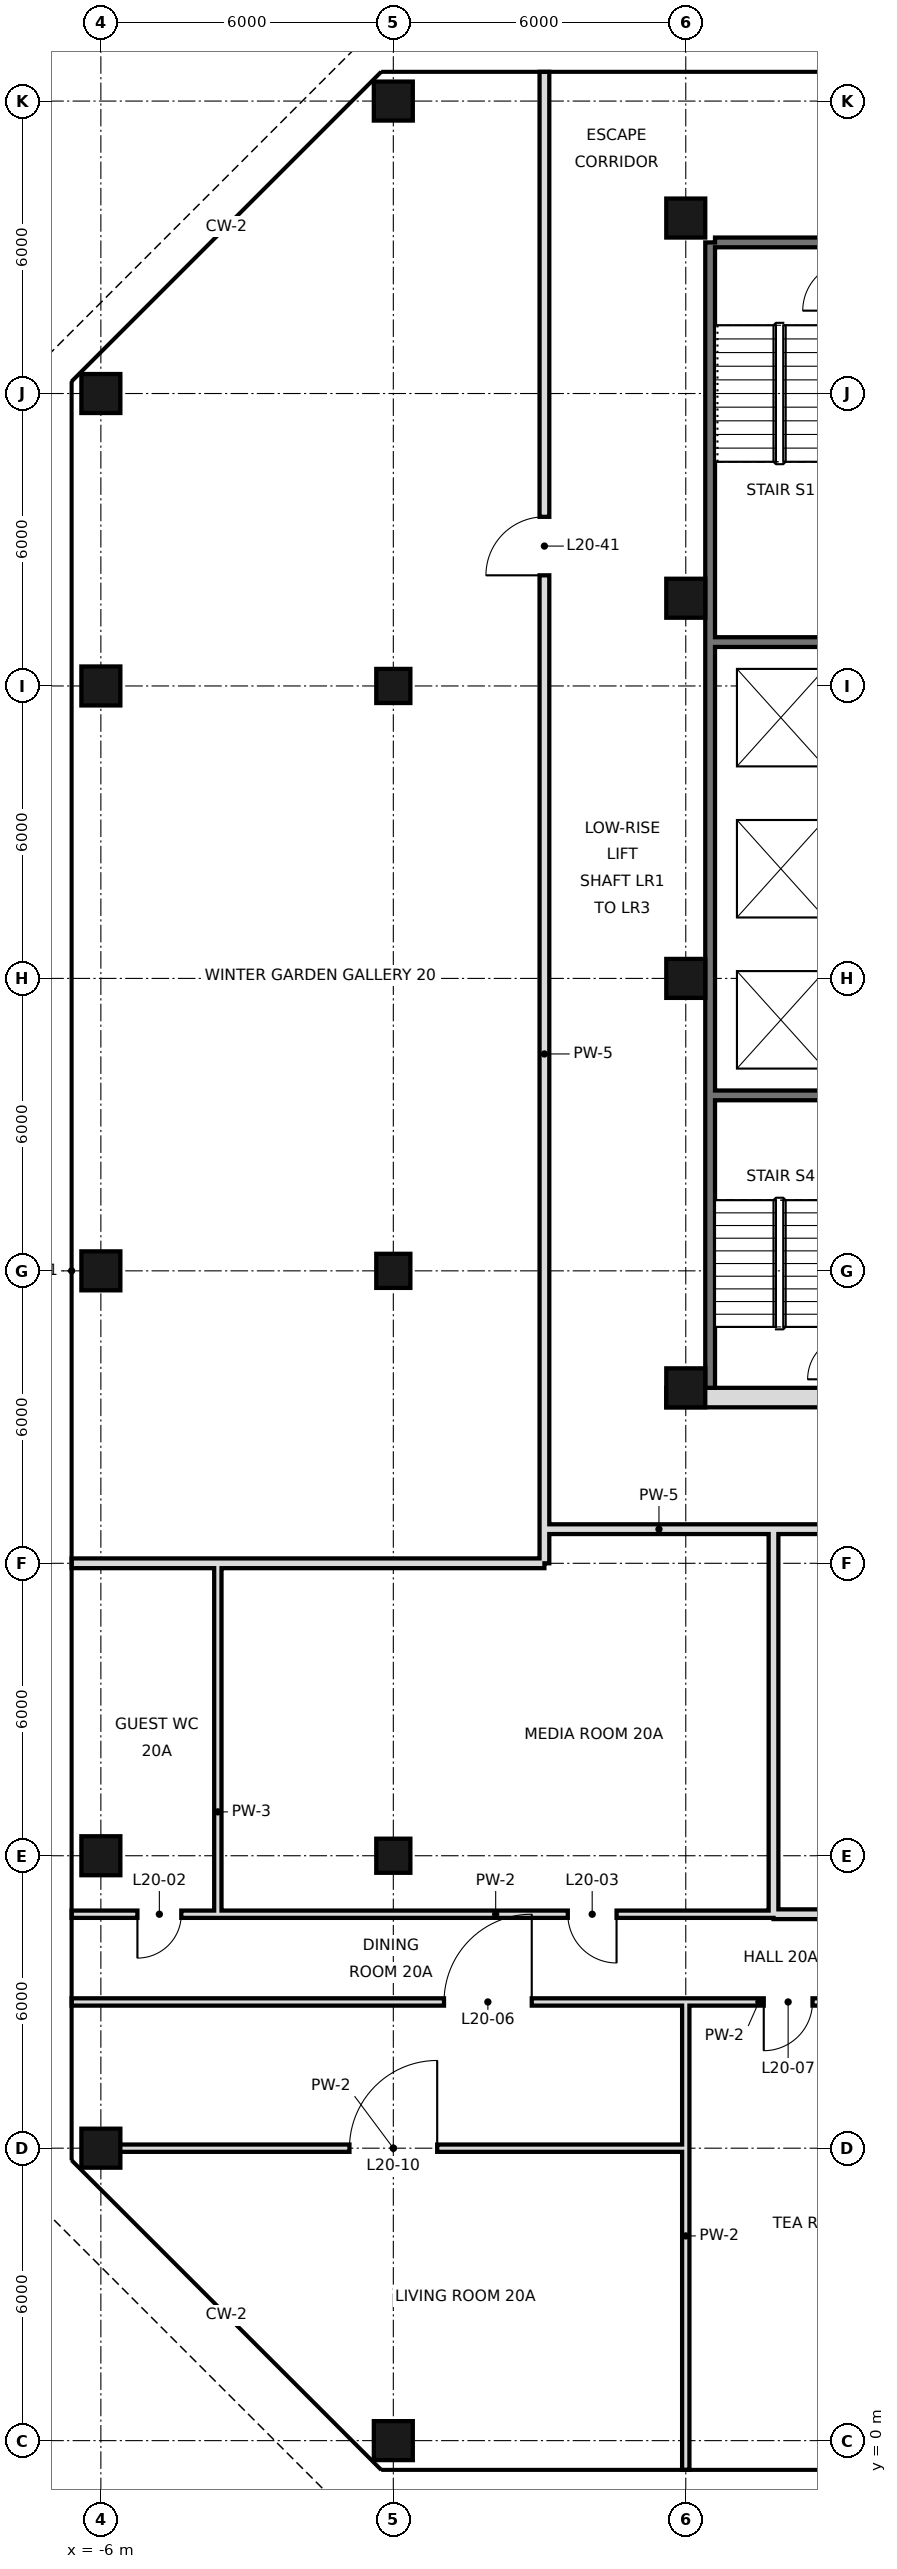
"""IFC4 building model, lengths in metres.
Left out: names, types, materials, properties, quantities, classifications, styles, units other than length and angle.
Written with IfcOpenShell. Run it as: python <this file> out.ifc"""

import sys

from ifc_helpers import new_model, si_unit, direction, frame, frame_2d, origin, origin_2d, place, context, subcontext, project, spatial, rectangle, hollow_rectangle, extrude, element, fill, save


model = new_model("IFC4")
c1 = context("Model", 3, precision=1e-05, world=origin(), true_north=direction((0.0, 1.0)))
c2 = subcontext(c1, "Body", "Model", "MODEL_VIEW")
j1 = project(units=[si_unit("LENGTHUNIT", "METRE"), si_unit("PLANEANGLEUNIT", "RADIAN")], contexts=[c1])
p1 = place(None, origin())
s1 = spatial("IfcSite", under=j1, at=p1, CompositionType="ELEMENT")
p2 = place(p1, origin())
s2 = spatial("IfcBuilding", under=s1, at=p2, CompositionType="ELEMENT")
p3 = place(p2, frame((0.0, 0.0, 96.2)))
s3 = spatial("IfcBuildingStorey", under=s2, at=p3, CompositionType="ELEMENT", Elevation=96.2)
for number, where, z_axis, x_axis in (
    (1, (-6.0, 6.0, -0.3), (0.0, 0.0, 1.0), (1.0, 0.0, 0.0)),
    (2, (-6.0, 12.0, -0.3), (0.0, 0.0, 1.0), (1.0, 0.0, 0.0)),
    (3, (-6.0, 24.0, -0.3), (0.0, 0.0, 1.0), (1.0, 0.0, 0.0)),
    (4, (-6.0, 36.0, -0.3), (0.0, 0.0, 1.0), (1.0, 0.0, 0.0)),
    (5, (-6.0, 42.0, -0.3), (0.0, 0.0, 1.0), (1.0, 0.0, 0.0)),
    (6, (0.0, 0.0, -0.3), (0.0, 0.0, 1.0), (1.0, 0.0, 0.0)),
):
    element("IfcColumn", number, at=place(p3, frame(where, z_axis=z_axis, x_axis=x_axis)), inside=s3, PredefinedType="COLUMN", context=c2, shape_type="SweptSolid", body=[
        extrude(hollow_rectangle(XDim=0.8, YDim=0.8, WallThickness=0.04, at=origin_2d()), origin(), (0.0, 0.0, 1.0), 3.9),
    ])
for number, where, z_axis, x_axis in (
    (7, (0.0, 12.0, 0.0), (0.0, 0.0, 1.0), (1.0, 0.0, 0.0)),
    (8, (0.0, 24.0, 0.0), (0.0, 0.0, 1.0), (1.0, 0.0, 0.0)),
    (9, (0.0, 36.0, 0.0), (0.0, 0.0, 1.0), (1.0, 0.0, 0.0)),
):
    element("IfcColumn", number, at=place(p3, frame(where, z_axis=z_axis, x_axis=x_axis)), inside=s3, PredefinedType="COLUMN", context=c2, shape_type="SweptSolid", body=[
        extrude(hollow_rectangle(XDim=0.7, YDim=0.7, WallThickness=0.036, at=origin_2d()), origin(), (0.0, 0.0, 1.0), 3.6),
    ])
p4 = place(p3, frame((0.0, 48.0, -0.3), z_axis=(0.0, 0.0, 1.0), x_axis=(1.0, 0.0, 0.0)))
e10 = element("IfcColumn", 10, at=p4, inside=s3, PredefinedType="COLUMN", context=c2, shape_type="SweptSolid", body=[
    extrude(hollow_rectangle(XDim=0.8, YDim=0.8, WallThickness=0.04, at=origin_2d()), origin(), (0.0, 0.0, 1.0), 3.9),
])
for number, where, z_axis, x_axis in (
    (11, (6.0, 21.6, 0.0), (0.0, 0.0, 1.0), (1.0, 0.0, 0.0)),
    (12, (6.0, 30.0, 0.0), (0.0, 0.0, 1.0), (1.0, 0.0, 0.0)),
    (13, (6.0, 37.8, 0.0), (0.0, 0.0, 1.0), (1.0, 0.0, 0.0)),
    (14, (6.0, 45.6, 0.0), (0.0, 0.0, 1.0), (1.0, 0.0, 0.0)),
):
    element("IfcColumn", number, at=place(p3, frame(where, z_axis=z_axis, x_axis=x_axis)), inside=s3, PredefinedType="COLUMN", context=c2, shape_type="SweptSolid", body=[
        extrude(hollow_rectangle(XDim=0.8, YDim=0.8, WallThickness=0.05, at=origin_2d()), origin(), (0.0, 0.0, 1.0), 3.6),
    ])
p5 = place(p3, frame((-3.6, 10.8, 0.0), z_axis=(0.0, 0.0, 1.0), x_axis=(0.0, 1.0, 0.0)))
e15 = element("IfcWall", 15, at=p5, inside=s3, PredefinedType="PARTITIONING", context=c2, shape_type="SweptSolid", body=[
    extrude(rectangle(XDim=7.2, YDim=0.15, at=frame_2d((3.6, 0.0))), origin(), (0.0, 0.0, 1.0), 3.42),
])
p6 = place(p3, frame((3.1, 18.0, 0.0), z_axis=(0.0, 0.0, 1.0), x_axis=(0.0, 1.0, 0.0)))
e16 = element("IfcWall", 16, at=p6, inside=s3, PredefinedType="SOLIDWALL", context=c2, shape_type="SweptSolid", body=[
    extrude(rectangle(XDim=30.6, YDim=0.2, at=frame_2d((15.3, 0.0))), origin(), (0.0, 0.0, 1.0), 2.72),
])
p7 = place(p6, frame((20.27, 0.0, 0.0)))
e17 = element("IfcOpeningElement", 17, at=p7, cuts=e16, PredefinedType="OPENING", context=c2, shape_type="SweptSolid", body=[
    extrude(rectangle(XDim=1.2, YDim=2.4, at=frame_2d((0.6, 1.2))), frame((0.0, 0.11, 0.0), z_axis=(0.0, -1.0, 0.0), x_axis=(1.0, 0.0, 0.0)), (0.0, 0.0, 1.0), 0.22),
])
p8 = place(p3, frame((6.0, -0.6, 0.0), z_axis=(0.0, 0.0, 1.0), x_axis=(0.0, 1.0, 0.0)))
e18 = element("IfcWall", 18, at=p8, inside=s3, PredefinedType="PARTITIONING", context=c2, shape_type="SweptSolid", body=[
    extrude(rectangle(XDim=9.6, YDim=0.15, at=frame_2d((4.8, 0.0))), origin(), (0.0, 0.0, 1.0), 2.72),
])
p9 = place(p3, frame((7.8, 10.8, 0.0), z_axis=(0.0, 0.0, 1.0), x_axis=(0.0, 1.0, 0.0)))
e19 = element("IfcWall", 19, at=p9, inside=s3, PredefinedType="SOLIDWALL", context=c2, shape_type="SweptSolid", body=[
    extrude(rectangle(XDim=7.9, YDim=0.2, at=frame_2d((3.95, 0.0))), origin(), (0.0, 0.0, 1.0), 2.72),
])
p10 = place(p3, frame((7.8, 10.8, 0.0), z_axis=(0.0, 0.0, 1.0), x_axis=(1.0, 0.0, 0.0)))
e20 = element("IfcWall", 20, at=p10, inside=s3, PredefinedType="SOLIDWALL", context=c2, shape_type="SweptSolid", body=[
    extrude(rectangle(XDim=4.8, YDim=0.2, at=frame_2d((2.4, 0.0))), origin(), (0.0, 0.0, 1.0), 2.72),
])
p11 = place(p10, frame((1.24, 0.0, 0.0)))
e21 = element("IfcOpeningElement", 21, at=p11, cuts=e20, PredefinedType="OPENING", context=c2, shape_type="SweptSolid", body=[
    extrude(rectangle(XDim=1.0, YDim=2.4, at=frame_2d((0.5, 1.2))), frame((0.0, 0.11, 0.0), z_axis=(0.0, -1.0, 0.0), x_axis=(1.0, 0.0, 0.0)), (0.0, 0.0, 1.0), 0.22),
])
p12 = place(p3, frame((-3.6, 10.8, 0.0), z_axis=(0.0, 0.0, 1.0), x_axis=(1.0, 0.0, 0.0)))
e22 = element("IfcWall", 22, at=p12, inside=s3, PredefinedType="PARTITIONING", context=c2, shape_type="SweptSolid", body=[
    extrude(rectangle(XDim=11.4, YDim=0.15, at=frame_2d((5.7, 0.0))), origin(), (0.0, 0.0, 1.0), 3.42),
])
p13 = place(p12, frame((7.18, 0.0, 0.0)))
e23 = element("IfcOpeningElement", 23, at=p13, cuts=e22, PredefinedType="OPENING", context=c2, shape_type="SweptSolid", body=[
    extrude(rectangle(XDim=1.0, YDim=2.4, at=frame_2d((0.5, 1.2))), frame((0.0, 0.085, 0.0), z_axis=(0.0, -1.0, 0.0), x_axis=(1.0, 0.0, 0.0)), (0.0, 0.0, 1.0), 0.17),
])
p14 = place(p3, frame((-6.6, 10.8, 0.0), z_axis=(0.0, 0.0, 1.0), x_axis=(1.0, 0.0, 0.0)))
e24 = element("IfcWall", 24, at=p14, inside=s3, PredefinedType="PARTITIONING", context=c2, shape_type="SweptSolid", body=[
    extrude(rectangle(XDim=3.0, YDim=0.15, at=frame_2d((1.5, 0.0))), origin(), (0.0, 0.0, 1.0), 3.42),
])
p15 = place(p14, frame((1.35, 0.0, 0.0)))
e25 = element("IfcOpeningElement", 25, at=p15, cuts=e24, PredefinedType="OPENING", context=c2, shape_type="SweptSolid", body=[
    extrude(rectangle(XDim=0.9, YDim=2.4, at=frame_2d((0.45, 1.2))), frame((0.0, 0.085, 0.0), z_axis=(0.0, -1.0, 0.0), x_axis=(1.0, 0.0, 0.0)), (0.0, 0.0, 1.0), 0.17),
])
p16 = place(p3, frame((-6.6, 18.0, 0.0), z_axis=(0.0, 0.0, 1.0), x_axis=(1.0, 0.0, 0.0)))
e26 = element("IfcWall", 26, at=p16, inside=s3, PredefinedType="SOLIDWALL", context=c2, shape_type="SweptSolid", body=[
    extrude(rectangle(XDim=9.7, YDim=0.2, at=frame_2d((4.85, 0.0))), origin(), (0.0, 0.0, 1.0), 2.72),
])
p17 = place(p3, frame((3.1, 18.7, 0.0), z_axis=(0.0, 0.0, 1.0), x_axis=(1.0, 0.0, 0.0)))
e27 = element("IfcWall", 27, at=p17, inside=s3, PredefinedType="SOLIDWALL", context=c2, shape_type="SweptSolid", body=[
    extrude(rectangle(XDim=4.7, YDim=0.2, at=frame_2d((2.35, 0.0))), origin(), (0.0, 0.0, 1.0), 2.72),
])
p18 = place(p3, frame((7.8, 18.7, 0.0), z_axis=(0.0, 0.0, 1.0), x_axis=(1.0, 0.0, 0.0)))
e28 = element("IfcWall", 28, at=p18, inside=s3, PredefinedType="SOLIDWALL", context=c2, shape_type="SweptSolid", body=[
    extrude(rectangle(XDim=4.8, YDim=0.2, at=frame_2d((2.4, 0.0))), origin(), (0.0, 0.0, 1.0), 3.42),
])
p19 = place(p3, frame((-6.0, 6.0, 0.0), z_axis=(0.0, 0.0, 1.0), x_axis=(1.0, 0.0, 0.0)))
e29 = element("IfcWall", 29, at=p19, inside=s3, PredefinedType="PARTITIONING", context=c2, shape_type="SweptSolid", body=[
    extrude(rectangle(XDim=12.0, YDim=0.15, at=frame_2d((6.0, 0.0))), origin(), (0.0, 0.0, 1.0), 2.97),
])
p20 = place(p19, frame((5.1, 0.0, 0.0)))
e30 = element("IfcOpeningElement", 30, at=p20, cuts=e29, PredefinedType="OPENING", context=c2, shape_type="SweptSolid", body=[
    extrude(rectangle(XDim=1.8, YDim=2.4, at=frame_2d((0.9, 1.2))), frame((0.0, 0.085, 0.0), z_axis=(0.0, -1.0, 0.0), x_axis=(1.0, 0.0, 0.0)), (0.0, 0.0, 1.0), 0.17),
])
p21 = place(p3, frame((-6.6, 9.0, 0.0), z_axis=(0.0, 0.0, 1.0), x_axis=(1.0, 0.0, 0.0)))
e31 = element("IfcWall", 31, at=p21, inside=s3, PredefinedType="PARTITIONING", context=c2, shape_type="SweptSolid", body=[
    extrude(rectangle(XDim=28.2, YDim=0.15, at=frame_2d((14.1, 0.0))), origin(), (0.0, 0.0, 1.0), 3.42),
])
p22 = place(p21, frame((7.64, 0.0, 0.0)))
e32 = element("IfcOpeningElement", 32, at=p22, cuts=e31, PredefinedType="OPENING", context=c2, shape_type="SweptSolid", body=[
    extrude(rectangle(XDim=1.8, YDim=2.4, at=frame_2d((0.9, 1.2))), frame((0.0, 0.085, 0.0), z_axis=(0.0, -1.0, 0.0), x_axis=(1.0, 0.0, 0.0)), (0.0, 0.0, 1.0), 0.17),
])
p23 = place(p21, frame((14.2, 0.0, 0.0)))
e33 = element("IfcOpeningElement", 33, at=p23, cuts=e31, PredefinedType="OPENING", context=c2, shape_type="SweptSolid", body=[
    extrude(rectangle(XDim=1.0, YDim=2.4, at=frame_2d((0.5, 1.2))), frame((0.0, 0.085, 0.0), z_axis=(0.0, -1.0, 0.0), x_axis=(1.0, 0.0, 0.0)), (0.0, 0.0, 1.0), 0.17),
])
p24 = place(p21, frame((21.1, 0.0, 0.0)))
e34 = element("IfcOpeningElement", 34, at=p24, cuts=e31, PredefinedType="OPENING", context=c2, shape_type="SweptSolid", body=[
    extrude(rectangle(XDim=1.0, YDim=2.4, at=frame_2d((0.5, 1.2))), frame((0.0, 0.085, 0.0), z_axis=(0.0, -1.0, 0.0), x_axis=(1.0, 0.0, 0.0)), (0.0, 0.0, 1.0), 0.17),
])
p25 = place(p21, frame((25.9, 0.0, 0.0)))
e35 = element("IfcOpeningElement", 35, at=p25, cuts=e31, PredefinedType="OPENING", context=c2, shape_type="SweptSolid", body=[
    extrude(rectangle(XDim=1.0, YDim=2.4, at=frame_2d((0.5, 1.2))), frame((0.0, 0.085, 0.0), z_axis=(0.0, -1.0, 0.0), x_axis=(1.0, 0.0, 0.0)), (0.0, 0.0, 1.0), 0.17),
])
p26 = place(p3, frame((6.5, 21.6, 0.0), z_axis=(0.0, 0.0, 1.0), x_axis=(0.0, 1.0, 0.0)))
e36 = element("IfcWall", 36, at=p26, inside=s3, PredefinedType="SOLIDWALL", context=c2, shape_type="SweptSolid", body=[
    extrude(rectangle(XDim=23.5, YDim=0.2, at=frame_2d((11.75, 0.0))), origin(), (0.0, 0.0, 1.0), 3.42),
])
p27 = place(p3, frame((6.6, 45.1, 0.0), z_axis=(0.0, 0.0, 1.0), x_axis=(1.0, 0.0, 0.0)))
e37 = element("IfcWall", 37, at=p27, inside=s3, PredefinedType="SOLIDWALL", context=c2, shape_type="SweptSolid", body=[
    extrude(rectangle(XDim=34.8, YDim=0.2, at=frame_2d((17.4, 0.0))), origin(), (0.0, 0.0, 1.0), 3.42),
])
p28 = place(p3, frame((5.6, 21.4, 0.0), z_axis=(0.0, 0.0, 1.0), x_axis=(1.0, 0.0, 0.0)))
e38 = element("IfcWall", 38, at=p28, inside=s3, PredefinedType="SOLIDWALL", context=c2, shape_type="SweptSolid", body=[
    extrude(rectangle(XDim=36.8, YDim=0.4, at=frame_2d((18.4, 0.0))), origin(), (0.0, 0.0, 1.0), 3.42),
])
p29 = place(p28, frame((8.5, 0.0, 0.0)))
e39 = element("IfcOpeningElement", 39, at=p29, cuts=e38, PredefinedType="OPENING", context=c2, shape_type="SweptSolid", body=[
    extrude(rectangle(XDim=1.8, YDim=2.1, at=frame_2d((0.9, 1.05))), frame((0.0, 0.21, 0.0), z_axis=(0.0, -1.0, 0.0), x_axis=(1.0, 0.0, 0.0)), (0.0, 0.0, 1.0), 0.42),
])
p30 = place(p28, frame((17.5, 0.0, 0.0)))
e40 = element("IfcOpeningElement", 40, at=p30, cuts=e38, PredefinedType="OPENING", context=c2, shape_type="SweptSolid", body=[
    extrude(rectangle(XDim=1.8, YDim=2.1, at=frame_2d((0.9, 1.05))), frame((0.0, 0.21, 0.0), z_axis=(0.0, -1.0, 0.0), x_axis=(1.0, 0.0, 0.0)), (0.0, 0.0, 1.0), 0.42),
])
p31 = place(p28, frame((26.5, 0.0, 0.0)))
e41 = element("IfcOpeningElement", 41, at=p31, cuts=e38, PredefinedType="OPENING", context=c2, shape_type="SweptSolid", body=[
    extrude(rectangle(XDim=1.8, YDim=2.1, at=frame_2d((0.9, 1.05))), frame((0.0, 0.21, 0.0), z_axis=(0.0, -1.0, 0.0), x_axis=(1.0, 0.0, 0.0)), (0.0, 0.0, 1.0), 0.42),
])
p32 = place(p28, frame((4.5, 0.0, 0.0)))
e42 = element("IfcOpeningElement", 42, at=p32, cuts=e38, PredefinedType="OPENING", context=c2, shape_type="SweptSolid", body=[
    extrude(rectangle(XDim=1.2, YDim=2.1, at=frame_2d((0.6, 1.05))), frame((0.0, 0.21, 0.0), z_axis=(0.0, -1.0, 0.0), x_axis=(1.0, 0.0, 0.0)), (0.0, 0.0, 1.0), 0.42),
])
p33 = place(p28, frame((31.1, 0.0, 0.0)))
e43 = element("IfcOpeningElement", 43, at=p33, cuts=e38, PredefinedType="OPENING", context=c2, shape_type="SweptSolid", body=[
    extrude(rectangle(XDim=1.2, YDim=2.1, at=frame_2d((0.6, 1.05))), frame((0.0, 0.21, 0.0), z_axis=(0.0, -1.0, 0.0), x_axis=(1.0, 0.0, 0.0)), (0.0, 0.0, 1.0), 0.42),
])
p34 = place(p3, frame((6.6, 27.6, 0.0), z_axis=(0.0, 0.0, 1.0), x_axis=(1.0, 0.0, 0.0)))
e44 = element("IfcWall", 44, at=p34, inside=s3, PredefinedType="SOLIDWALL", context=c2, shape_type="SweptSolid", body=[
    extrude(rectangle(XDim=5.3, YDim=0.2, at=frame_2d((2.65, 0.0))), origin(), (0.0, 0.0, 1.0), 3.42),
])
p35 = place(p3, frame((6.6, 36.9, 0.0), z_axis=(0.0, 0.0, 1.0), x_axis=(1.0, 0.0, 0.0)))
e45 = element("IfcWall", 45, at=p35, inside=s3, PredefinedType="SOLIDWALL", context=c2, shape_type="SweptSolid", body=[
    extrude(rectangle(XDim=2.7, YDim=0.2, at=frame_2d((1.35, 0.0))), origin(), (0.0, 0.0, 1.0), 3.42),
])
p36 = place(p15, frame((0.9, 0.0, 0.0), z_axis=(0.0, 0.0, 1.0), x_axis=(-1.0, 0.0, 0.0)))
e46 = element("IfcDoor", 46, at=p36, inside=s3, OperationType="SINGLE_SWING_RIGHT", PredefinedType="DOOR", context=c2, shape_type="SweptSolid", body=[
    extrude(rectangle(XDim=0.9, YDim=2.4, at=frame_2d((0.45, 1.2))), frame((0.0, 0.025, 0.0), z_axis=(0.0, -1.0, 0.0), x_axis=(1.0, 0.0, 0.0)), (0.0, 0.0, 1.0), 0.05),
])
fill(e25, e46)
p37 = place(p13, origin())
e47 = element("IfcDoor", 47, at=p37, inside=s3, OperationType="SINGLE_SWING_RIGHT", PredefinedType="DOOR", context=c2, shape_type="SweptSolid", body=[
    extrude(rectangle(XDim=1.0, YDim=2.4, at=frame_2d((0.5, 1.2))), frame((0.0, 0.025, 0.0), z_axis=(0.0, -1.0, 0.0), x_axis=(1.0, 0.0, 0.0)), (0.0, 0.0, 1.0), 0.05),
])
fill(e23, e47)
p38 = place(p22, frame((1.8, 0.0, 0.0), z_axis=(0.0, 0.0, 1.0), x_axis=(-1.0, 0.0, 0.0)))
e48 = element("IfcDoor", 48, at=p38, inside=s3, OperationType="SINGLE_SWING_LEFT", PredefinedType="DOOR", context=c2, shape_type="SweptSolid", body=[
    extrude(rectangle(XDim=1.8, YDim=2.4, at=frame_2d((0.9, 1.2))), frame((0.0, 0.025, 0.0), z_axis=(0.0, -1.0, 0.0), x_axis=(1.0, 0.0, 0.0)), (0.0, 0.0, 1.0), 0.05),
])
fill(e32, e48)
p39 = place(p23, frame((1.0, 0.0, 0.0), z_axis=(0.0, 0.0, 1.0), x_axis=(-1.0, 0.0, 0.0)))
e49 = element("IfcDoor", 49, at=p39, inside=s3, OperationType="SINGLE_SWING_RIGHT", PredefinedType="DOOR", context=c2, shape_type="SweptSolid", body=[
    extrude(rectangle(XDim=1.0, YDim=2.4, at=frame_2d((0.5, 1.2))), frame((0.0, 0.025, 0.0), z_axis=(0.0, -1.0, 0.0), x_axis=(1.0, 0.0, 0.0)), (0.0, 0.0, 1.0), 0.05),
])
fill(e33, e49)
p40 = place(p20, frame((1.8, 0.0, 0.0), z_axis=(0.0, 0.0, 1.0), x_axis=(-1.0, 0.0, 0.0)))
e50 = element("IfcDoor", 50, at=p40, inside=s3, OperationType="SINGLE_SWING_LEFT", PredefinedType="DOOR", context=c2, shape_type="SweptSolid", body=[
    extrude(rectangle(XDim=1.8, YDim=2.4, at=frame_2d((0.9, 1.2))), frame((0.0, 0.025, 0.0), z_axis=(0.0, -1.0, 0.0), x_axis=(1.0, 0.0, 0.0)), (0.0, 0.0, 1.0), 0.05),
])
fill(e30, e50)
p41 = place(p7, origin())
e51 = element("IfcDoor", 51, at=p41, inside=s3, OperationType="SINGLE_SWING_LEFT", PredefinedType="DOOR", context=c2, shape_type="SweptSolid", body=[
    extrude(rectangle(XDim=1.2, YDim=2.4, at=frame_2d((0.6, 1.2))), frame((0.0, 0.025, 0.0), z_axis=(0.0, -1.0, 0.0), x_axis=(1.0, 0.0, 0.0)), (0.0, 0.0, 1.0), 0.05),
])
fill(e17, e51)
save(model, sys.argv[1])
